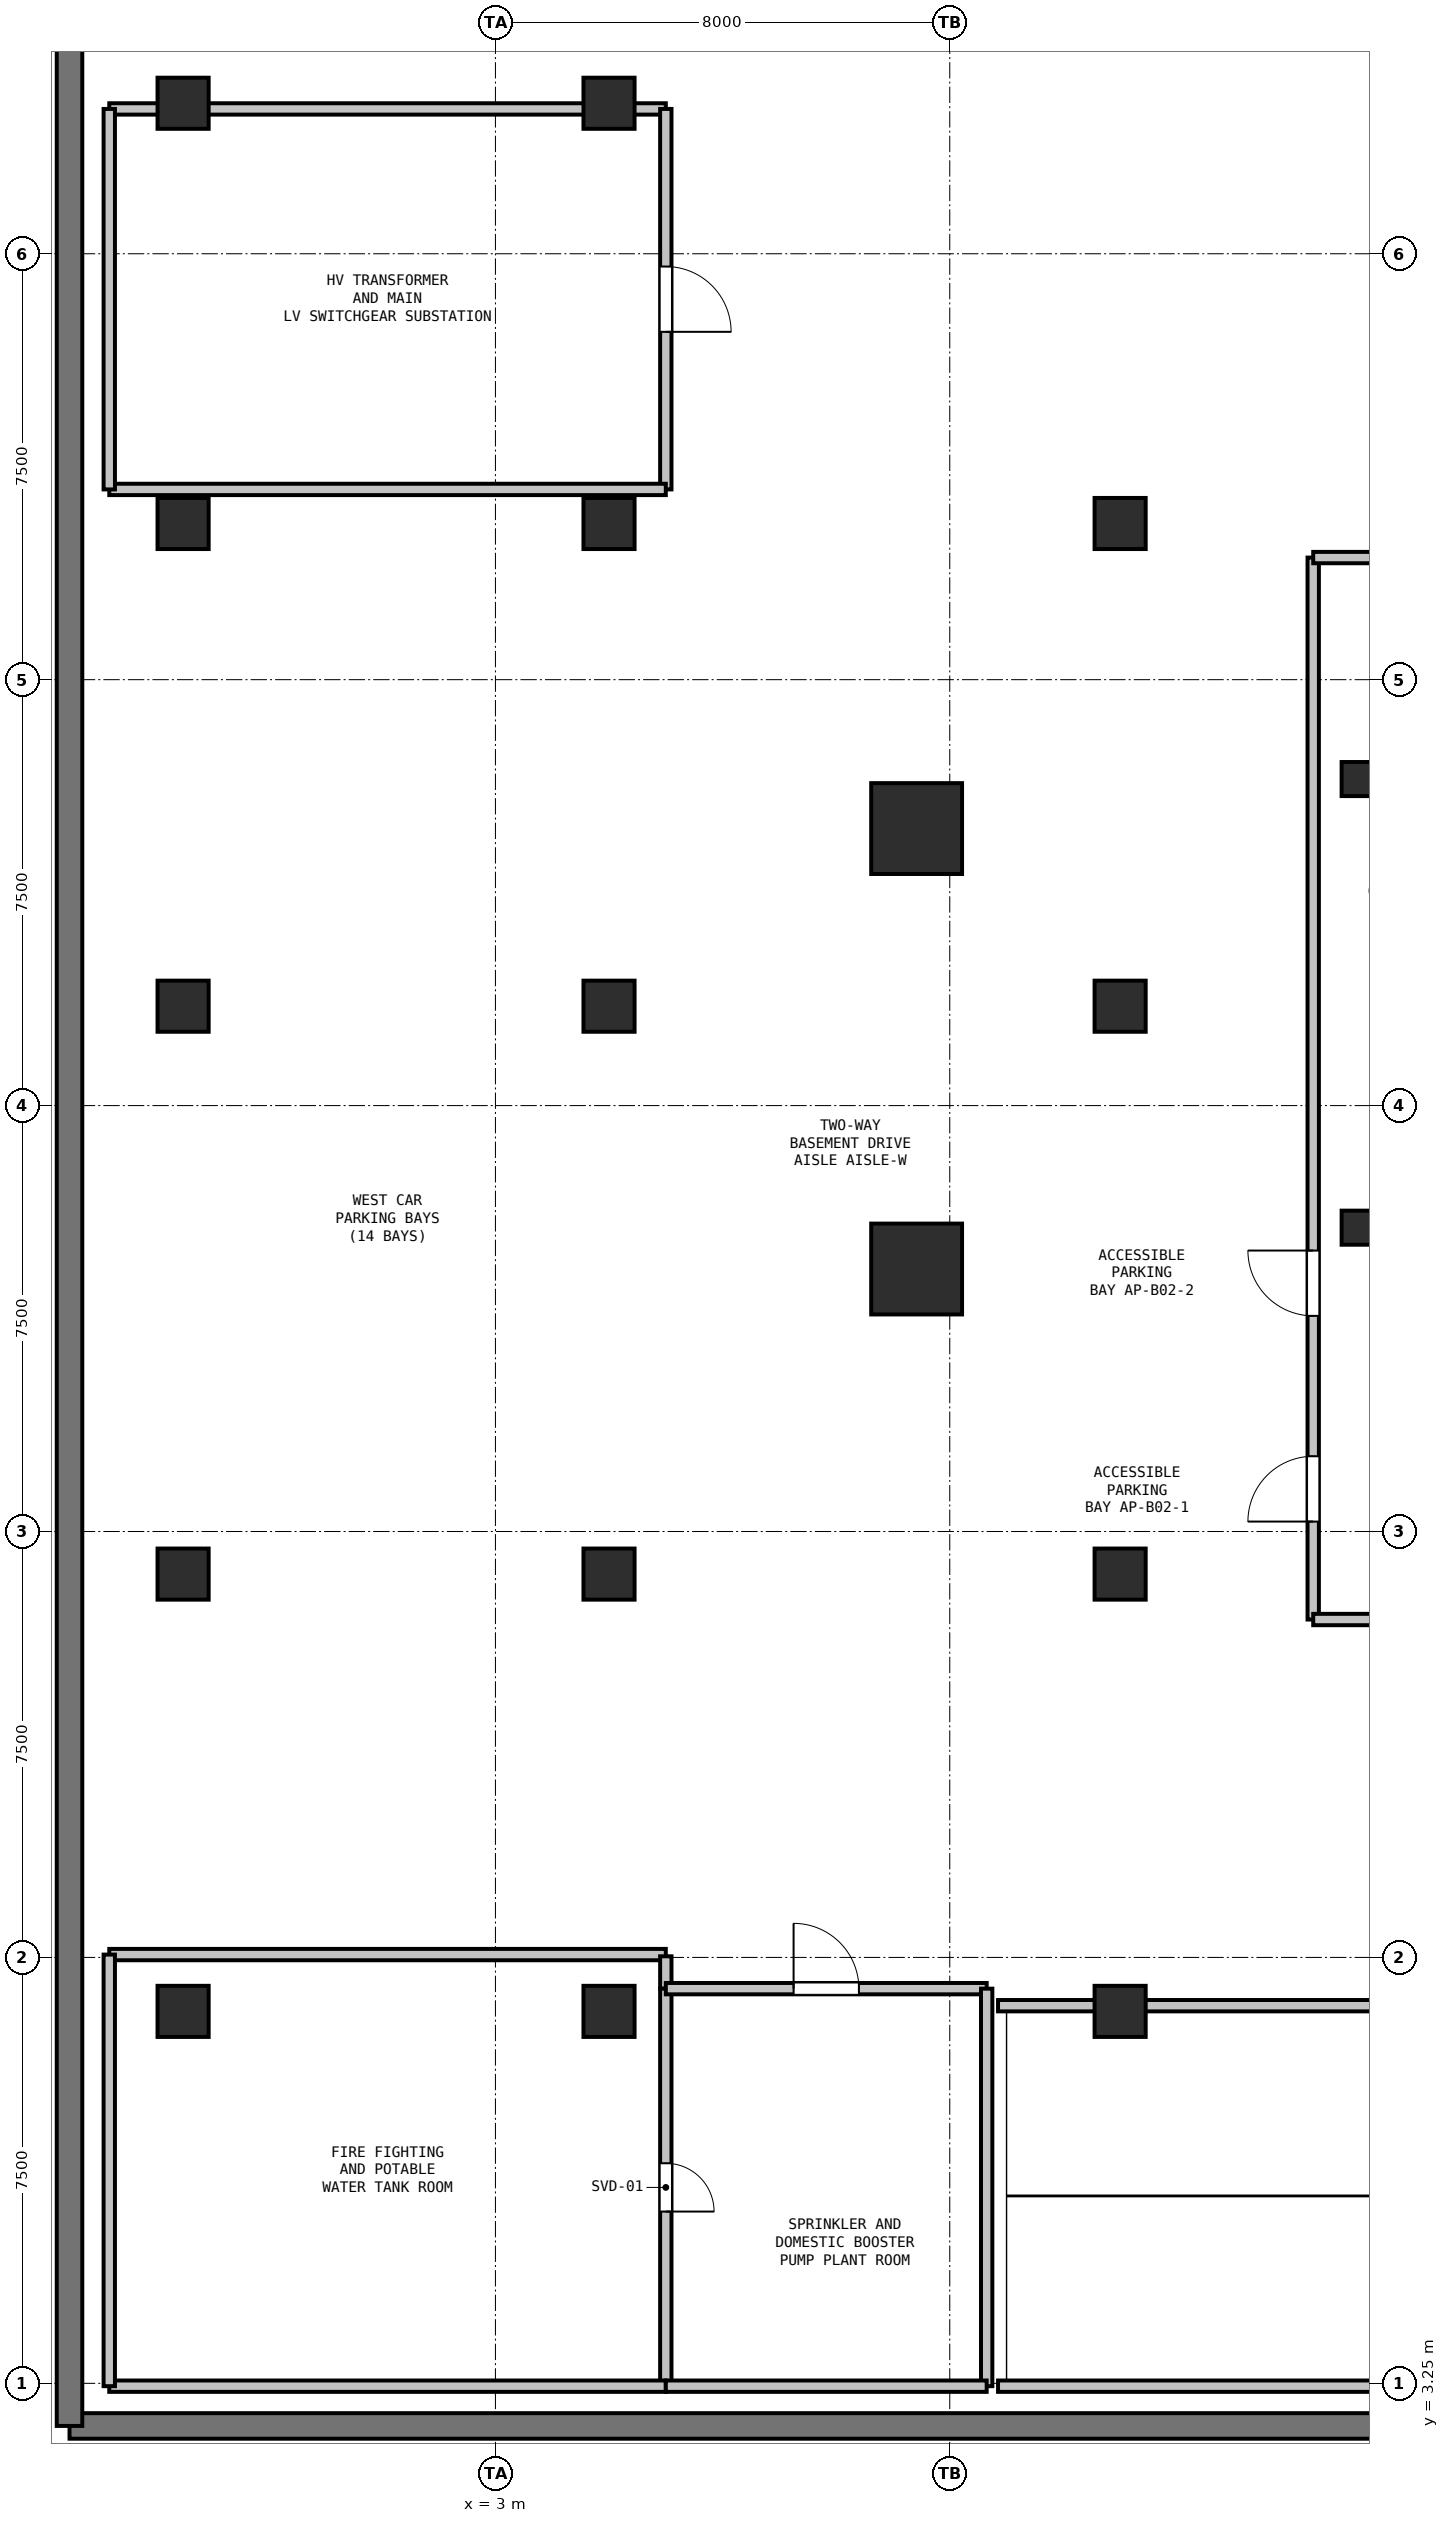
"""IFC4 building model, lengths in metres.
Left out: names, types, materials, properties, quantities, classifications, styles, units other than length and angle.
Written with IfcOpenShell. Run it as: python <this file> out.ifc"""

import sys

from ifc_helpers import new_model, si_unit, direction, frame, frame_2d, origin, origin_2d, place, context, subcontext, project, spatial, rectangle, hollow_rectangle, extrude, element, fill, save


model = new_model("IFC4")
c1 = context("Model", 3, precision=1e-05, world=origin(), true_north=direction((0.0, 1.0)))
c2 = subcontext(c1, "Body", "Model", "MODEL_VIEW")
j1 = project(units=[si_unit("LENGTHUNIT", "METRE"), si_unit("PLANEANGLEUNIT", "RADIAN")], contexts=[c1])
p1 = place(None, origin())
s1 = spatial("IfcSite", under=j1, at=p1, CompositionType="ELEMENT")
p2 = place(p1, origin())
s2 = spatial("IfcBuilding", under=s1, at=p2, CompositionType="ELEMENT")
p3 = place(p2, frame((0.0, 0.0, -9.0)))
s3 = spatial("IfcBuildingStorey", under=s2, at=p3, CompositionType="ELEMENT", Elevation=-9.0)
p4 = place(p3, frame((-4.5, 2.5, 0.0), z_axis=(0.0, 0.0, 1.0), x_axis=(1.0, 0.0, 0.0)))
e1 = element("IfcWall", 1, at=p4, inside=s3, PredefinedType="USERDEFINED", context=c2, shape_type="SweptSolid", body=[
    extrude(rectangle(XDim=81.5, YDim=0.45, at=frame_2d((40.75, 0.0))), origin(), (0.0, 0.0, 1.0), 4.5),
])
p5 = place(p3, frame((-4.5, 51.0, 0.0), z_axis=(0.0, 0.0, 1.0), x_axis=(0.0, -1.0, 0.0)))
e2 = element("IfcWall", 2, at=p5, inside=s3, PredefinedType="USERDEFINED", context=c2, shape_type="SweptSolid", body=[
    extrude(rectangle(XDim=48.5, YDim=0.45, at=frame_2d((24.25, 0.0))), origin(), (0.0, 0.0, 1.0), 4.5),
])
for number, where, z_axis, x_axis in (
    (3, (10.417, 30.628, 0.0), (0.0, 0.0, 1.0), (1.0, 0.0, 0.0)),
    (4, (10.417, 22.872, 0.0), (0.0, 0.0, 1.0), (1.0, 0.0, 0.0)),
):
    element("IfcColumn", number, at=place(p3, frame(where, z_axis=z_axis, x_axis=x_axis)), inside=s3, PredefinedType="COLUMN", context=c2, shape_type="SweptSolid", body=[
        extrude(hollow_rectangle(XDim=1.6, YDim=1.6, WallThickness=0.04, at=origin_2d()), origin(), (0.0, 0.0, 1.0), 4.5),
    ])
for number, where, z_axis, x_axis in (
    (5, (18.2, 23.6, 0.0), (0.0, 0.0, 1.0), (1.0, 0.0, 0.0)),
    (6, (18.2, 31.5, 0.0), (0.0, 0.0, 1.0), (1.0, 0.0, 0.0)),
):
    element("IfcColumn", number, at=place(p3, frame(where, z_axis=z_axis, x_axis=x_axis)), inside=s3, PredefinedType="COLUMN", context=c2, shape_type="SweptSolid", body=[
        extrude(rectangle(XDim=0.6, YDim=0.6, at=origin_2d()), origin(), (0.0, 0.0, 1.0), 4.5),
    ])
for number, where, z_axis, x_axis in (
    (7, (-2.5, 9.8, 0.0), (0.0, 0.0, 1.0), (1.0, 0.0, 0.0)),
    (8, (-2.5, 17.5, 0.0), (0.0, 0.0, 1.0), (1.0, 0.0, 0.0)),
    (9, (-2.5, 27.5, 0.0), (0.0, 0.0, 1.0), (1.0, 0.0, 0.0)),
    (10, (-2.5, 36.0, 0.0), (0.0, 0.0, 1.0), (1.0, 0.0, 0.0)),
    (11, (-2.5, 43.4, 0.0), (0.0, 0.0, 1.0), (1.0, 0.0, 0.0)),
    (12, (5.0, 9.8, 0.0), (0.0, 0.0, 1.0), (1.0, 0.0, 0.0)),
    (13, (5.0, 17.5, 0.0), (0.0, 0.0, 1.0), (1.0, 0.0, 0.0)),
    (14, (5.0, 27.5, 0.0), (0.0, 0.0, 1.0), (1.0, 0.0, 0.0)),
    (15, (5.0, 36.0, 0.0), (0.0, 0.0, 1.0), (1.0, 0.0, 0.0)),
    (16, (5.0, 43.4, 0.0), (0.0, 0.0, 1.0), (1.0, 0.0, 0.0)),
    (17, (14.0, 9.8, 0.0), (0.0, 0.0, 1.0), (1.0, 0.0, 0.0)),
    (18, (14.0, 17.5, 0.0), (0.0, 0.0, 1.0), (1.0, 0.0, 0.0)),
    (19, (14.0, 27.5, 0.0), (0.0, 0.0, 1.0), (1.0, 0.0, 0.0)),
    (20, (14.0, 36.0, 0.0), (0.0, 0.0, 1.0), (1.0, 0.0, 0.0)),
):
    element("IfcColumn", number, at=place(p3, frame(where, z_axis=z_axis, x_axis=x_axis)), inside=s3, PredefinedType="COLUMN", context=c2, shape_type="SweptSolid", body=[
        extrude(rectangle(XDim=0.9, YDim=0.9, at=origin_2d()), origin(), (0.0, 0.0, 1.0), 4.5),
    ])
for number, where, z_axis, x_axis in (
    (21, (11.85, 9.9, 0.0), (0.0, 0.0, 1.0), (1.0, 0.0, 0.0)),
    (22, (45.2, 3.2, 0.0), (0.0, 0.0, 1.0), (-1.0, 0.0, 0.0)),
):
    element("IfcWall", number, at=place(p3, frame(where, z_axis=z_axis, x_axis=x_axis)), inside=s3, PredefinedType="PARAPET", context=c2, shape_type="SweptSolid", body=[
        extrude(rectangle(XDim=33.35, YDim=0.2, at=frame_2d((16.675, 0.0))), origin(), (0.0, 0.0, 1.0), 5.75),
    ])
p6 = place(p3, frame((17.4, 16.7, 0.0), z_axis=(0.0, 0.0, 1.0), x_axis=(0.0, 1.0, 0.0)))
e23 = element("IfcWall", 23, at=p6, inside=s3, PredefinedType="PARTITIONING", context=c2, shape_type="SweptSolid", body=[
    extrude(rectangle(XDim=18.7, YDim=0.2, at=frame_2d((9.35, 0.0))), origin(), (0.0, 0.0, 1.0), 4.2),
])
p7 = place(p6, frame((1.725, 0.0, 0.0)))
e24 = element("IfcOpeningElement", 24, at=p7, cuts=e23, PredefinedType="OPENING", context=c2, shape_type="SweptSolid", body=[
    extrude(rectangle(XDim=1.15, YDim=2.15, at=frame_2d((0.575, 1.075))), frame((0.0, 0.11, 0.0), z_axis=(0.0, -1.0, 0.0), x_axis=(1.0, 0.0, 0.0)), (0.0, 0.0, 1.0), 0.22),
])
p8 = place(p6, frame((5.347, 0.0, 0.0)))
e25 = element("IfcOpeningElement", 25, at=p8, cuts=e23, PredefinedType="OPENING", context=c2, shape_type="SweptSolid", body=[
    extrude(rectangle(XDim=1.15, YDim=2.15, at=frame_2d((0.575, 1.075))), frame((0.0, 0.11, 0.0), z_axis=(0.0, -1.0, 0.0), x_axis=(1.0, 0.0, 0.0)), (0.0, 0.0, 1.0), 0.22),
])
p9 = place(p3, frame((17.4, 35.4, 0.0), z_axis=(0.0, 0.0, 1.0), x_axis=(1.0, 0.0, 0.0)))
e26 = element("IfcWall", 26, at=p9, inside=s3, PredefinedType="PARTITIONING", context=c2, shape_type="SweptSolid", body=[
    extrude(rectangle(XDim=4.8, YDim=0.2, at=frame_2d((2.4, 0.0))), origin(), (0.0, 0.0, 1.0), 4.2),
])
p10 = place(p3, frame((36.65, 16.7, 0.0), z_axis=(0.0, 0.0, 1.0), x_axis=(-1.0, 0.0, 0.0)))
e27 = element("IfcWall", 27, at=p10, inside=s3, PredefinedType="PARTITIONING", context=c2, shape_type="SweptSolid", body=[
    extrude(rectangle(XDim=19.25, YDim=0.2, at=frame_2d((9.625, 0.0))), origin(), (0.0, 0.0, 1.0), 4.2),
])
p11 = place(p10, frame((9.05, 0.0, 0.0)))
e28 = element("IfcOpeningElement", 28, at=p11, cuts=e27, PredefinedType="OPENING", context=c2, shape_type="SweptSolid", body=[
    extrude(rectangle(XDim=1.15, YDim=2.15, at=frame_2d((0.575, 1.075))), frame((0.0, 0.11, 0.0), z_axis=(0.0, -1.0, 0.0), x_axis=(1.0, 0.0, 0.0)), (0.0, 0.0, 1.0), 0.22),
])
p12 = place(p3, frame((-3.8, 10.8, 0.0), z_axis=(0.0, 0.0, 1.0), x_axis=(1.0, 0.0, 0.0)))
e29 = element("IfcWall", 29, at=p12, inside=s3, PredefinedType="PARTITIONING", context=c2, shape_type="SweptSolid", body=[
    extrude(rectangle(XDim=9.8, YDim=0.2, at=frame_2d((4.9, 0.0))), origin(), (0.0, 0.0, 1.0), 4.2),
])
p13 = place(p3, frame((6.0, 10.77, 0.0), z_axis=(0.0, 0.0, 1.0), x_axis=(0.0, -1.0, 0.0)))
e30 = element("IfcWall", 30, at=p13, inside=s3, PredefinedType="PARTITIONING", context=c2, shape_type="SweptSolid", body=[
    extrude(rectangle(XDim=0.57, YDim=0.2, at=frame_2d((0.285, 0.0))), origin(), (0.0, 0.0, 1.0), 4.2),
])
p14 = place(p3, frame((6.0, 10.2, 0.0), z_axis=(0.0, 0.0, 1.0), x_axis=(0.0, -1.0, 0.0)))
e31 = element("IfcWall", 31, at=p14, inside=s3, PredefinedType="PARTITIONING", context=c2, shape_type="SweptSolid", body=[
    extrude(rectangle(XDim=7.0, YDim=0.2, at=frame_2d((3.5, 0.0))), origin(), (0.0, 0.0, 1.0), 4.2),
])
p15 = place(p14, frame((3.075, 0.0, 0.0)))
e32 = element("IfcOpeningElement", 32, at=p15, cuts=e31, PredefinedType="OPENING", context=c2, shape_type="SweptSolid", body=[
    extrude(rectangle(XDim=0.85, YDim=2.1, at=frame_2d((0.425, 1.05))), frame((0.0, 0.11, 0.0), z_axis=(0.0, -1.0, 0.0), x_axis=(1.0, 0.0, 0.0)), (0.0, 0.0, 1.0), 0.22),
])
p16 = place(p3, frame((6.0, 3.2, 0.0), z_axis=(0.0, 0.0, 1.0), x_axis=(-1.0, 0.0, 0.0)))
e33 = element("IfcWall", 33, at=p16, inside=s3, PredefinedType="PARTITIONING", context=c2, shape_type="SweptSolid", body=[
    extrude(rectangle(XDim=9.8, YDim=0.2, at=frame_2d((4.9, 0.0))), origin(), (0.0, 0.0, 1.0), 4.2),
])
p17 = place(p3, frame((-3.8, 3.2, 0.0), z_axis=(0.0, 0.0, 1.0), x_axis=(0.0, 1.0, 0.0)))
e34 = element("IfcWall", 34, at=p17, inside=s3, PredefinedType="PARTITIONING", context=c2, shape_type="SweptSolid", body=[
    extrude(rectangle(XDim=7.6, YDim=0.2, at=frame_2d((3.8, 0.0))), origin(), (0.0, 0.0, 1.0), 4.2),
])
p18 = place(p3, frame((6.0, 10.2, 0.0), z_axis=(0.0, 0.0, 1.0), x_axis=(1.0, 0.0, 0.0)))
e35 = element("IfcWall", 35, at=p18, inside=s3, PredefinedType="PARTITIONING", context=c2, shape_type="SweptSolid", body=[
    extrude(rectangle(XDim=5.65, YDim=0.2, at=frame_2d((2.825, 0.0))), origin(), (0.0, 0.0, 1.0), 4.2),
])
p19 = place(p18, frame((2.25, 0.0, 0.0)))
e36 = element("IfcOpeningElement", 36, at=p19, cuts=e35, PredefinedType="OPENING", context=c2, shape_type="SweptSolid", body=[
    extrude(rectangle(XDim=1.15, YDim=2.15, at=frame_2d((0.575, 1.075))), frame((0.0, 0.11, 0.0), z_axis=(0.0, -1.0, 0.0), x_axis=(1.0, 0.0, 0.0)), (0.0, 0.0, 1.0), 0.22),
])
p20 = place(p3, frame((11.65, 10.2, 0.0), z_axis=(0.0, 0.0, 1.0), x_axis=(0.0, -1.0, 0.0)))
e37 = element("IfcWall", 37, at=p20, inside=s3, PredefinedType="PARTITIONING", context=c2, shape_type="SweptSolid", body=[
    extrude(rectangle(XDim=7.0, YDim=0.2, at=frame_2d((3.5, 0.0))), origin(), (0.0, 0.0, 1.0), 4.2),
])
p21 = place(p3, frame((11.65, 3.2, 0.0), z_axis=(0.0, 0.0, 1.0), x_axis=(-1.0, 0.0, 0.0)))
e38 = element("IfcWall", 38, at=p21, inside=s3, PredefinedType="PARTITIONING", context=c2, shape_type="SweptSolid", body=[
    extrude(rectangle(XDim=5.65, YDim=0.2, at=frame_2d((2.825, 0.0))), origin(), (0.0, 0.0, 1.0), 4.2),
])
p22 = place(p3, frame((-3.8, 43.3, 0.0), z_axis=(0.0, 0.0, 1.0), x_axis=(1.0, 0.0, 0.0)))
e39 = element("IfcWall", 39, at=p22, inside=s3, PredefinedType="PARTITIONING", context=c2, shape_type="SweptSolid", body=[
    extrude(rectangle(XDim=9.8, YDim=0.2, at=frame_2d((4.9, 0.0))), origin(), (0.0, 0.0, 1.0), 4.2),
])
p23 = place(p3, frame((6.0, 43.3, 0.0), z_axis=(0.0, 0.0, 1.0), x_axis=(0.0, -1.0, 0.0)))
e40 = element("IfcWall", 40, at=p23, inside=s3, PredefinedType="PARTITIONING", context=c2, shape_type="SweptSolid", body=[
    extrude(rectangle(XDim=6.7, YDim=0.2, at=frame_2d((3.35, 0.0))), origin(), (0.0, 0.0, 1.0), 4.2),
])
p24 = place(p23, frame((2.775, 0.0, 0.0)))
e41 = element("IfcOpeningElement", 41, at=p24, cuts=e40, PredefinedType="OPENING", context=c2, shape_type="SweptSolid", body=[
    extrude(rectangle(XDim=1.15, YDim=2.15, at=frame_2d((0.575, 1.075))), frame((0.0, 0.11, 0.0), z_axis=(0.0, -1.0, 0.0), x_axis=(1.0, 0.0, 0.0)), (0.0, 0.0, 1.0), 0.22),
])
p25 = place(p3, frame((6.0, 36.6, 0.0), z_axis=(0.0, 0.0, 1.0), x_axis=(-1.0, 0.0, 0.0)))
e42 = element("IfcWall", 42, at=p25, inside=s3, PredefinedType="PARTITIONING", context=c2, shape_type="SweptSolid", body=[
    extrude(rectangle(XDim=9.8, YDim=0.2, at=frame_2d((4.9, 0.0))), origin(), (0.0, 0.0, 1.0), 4.2),
])
p26 = place(p3, frame((-3.8, 36.6, 0.0), z_axis=(0.0, 0.0, 1.0), x_axis=(0.0, 1.0, 0.0)))
e43 = element("IfcWall", 43, at=p26, inside=s3, PredefinedType="PARTITIONING", context=c2, shape_type="SweptSolid", body=[
    extrude(rectangle(XDim=6.7, YDim=0.2, at=frame_2d((3.35, 0.0))), origin(), (0.0, 0.0, 1.0), 4.2),
])
p27 = place(p7, origin())
e44 = element("IfcDoor", 44, at=p27, inside=s3, OperationType="SINGLE_SWING_LEFT", PredefinedType="DOOR", context=c2, shape_type="SweptSolid", body=[
    extrude(rectangle(XDim=1.15, YDim=2.15, at=frame_2d((0.575, 1.075))), frame((0.0, 0.025, 0.0), z_axis=(0.0, -1.0, 0.0), x_axis=(1.0, 0.0, 0.0)), (0.0, 0.0, 1.0), 0.05),
])
fill(e24, e44)
p28 = place(p8, origin())
e45 = element("IfcDoor", 45, at=p28, inside=s3, OperationType="SINGLE_SWING_RIGHT", PredefinedType="DOOR", context=c2, shape_type="SweptSolid", body=[
    extrude(rectangle(XDim=1.15, YDim=2.15, at=frame_2d((0.575, 1.075))), frame((0.0, 0.025, 0.0), z_axis=(0.0, -1.0, 0.0), x_axis=(1.0, 0.0, 0.0)), (0.0, 0.0, 1.0), 0.05),
])
fill(e25, e45)
p29 = place(p19, origin())
e46 = element("IfcDoor", 46, at=p29, inside=s3, OperationType="SINGLE_SWING_LEFT", PredefinedType="DOOR", context=c2, shape_type="SweptSolid", body=[
    extrude(rectangle(XDim=1.15, YDim=2.15, at=frame_2d((0.575, 1.075))), frame((0.0, 0.025, 0.0), z_axis=(0.0, -1.0, 0.0), x_axis=(1.0, 0.0, 0.0)), (0.0, 0.0, 1.0), 0.05),
])
fill(e36, e46)
p30 = place(p24, origin())
e47 = element("IfcDoor", 47, at=p30, inside=s3, OperationType="SINGLE_SWING_RIGHT", PredefinedType="DOOR", context=c2, shape_type="SweptSolid", body=[
    extrude(rectangle(XDim=1.15, YDim=2.15, at=frame_2d((0.575, 1.075))), frame((0.0, 0.025, 0.0), z_axis=(0.0, -1.0, 0.0), x_axis=(1.0, 0.0, 0.0)), (0.0, 0.0, 1.0), 0.05),
])
fill(e41, e47)
p31 = place(p15, origin())
e48 = element("IfcDoor", 48, at=p31, inside=s3, OperationType="SINGLE_SWING_RIGHT", PredefinedType="DOOR", context=c2, shape_type="SweptSolid", body=[
    extrude(rectangle(XDim=0.85, YDim=2.1, at=frame_2d((0.425, 1.05))), frame((0.0, 0.025, 0.0), z_axis=(0.0, -1.0, 0.0), x_axis=(1.0, 0.0, 0.0)), (0.0, 0.0, 1.0), 0.05),
])
fill(e32, e48)
save(model, sys.argv[1])
